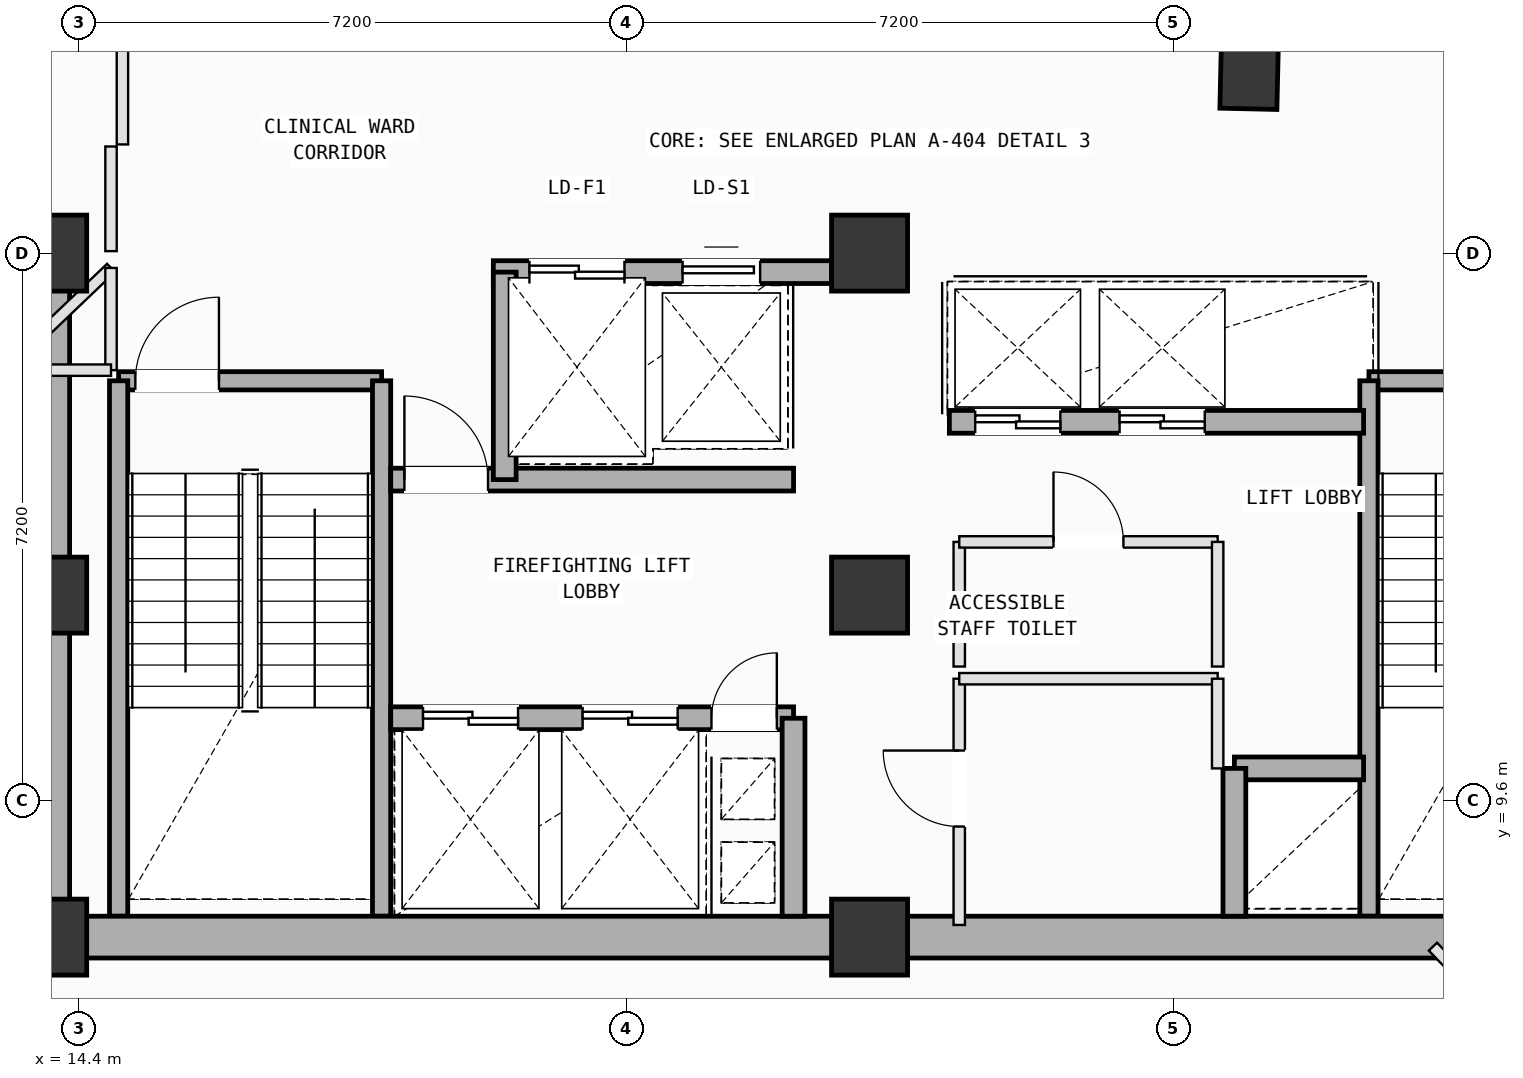
"""IFC4 building model, lengths in metres.
Left out: names, types, materials, properties, quantities, classifications, styles, units other than length and angle.
Written with IfcOpenShell. Run it as: python <this file> out.ifc"""

import sys

from ifc_helpers import new_model, si_unit, direction, frame, frame_2d, origin, origin_2d, place, context, subcontext, project, spatial, rectangle, extrude, element, fill, save


model = new_model("IFC4")
c1 = context("Model", 3, precision=1e-05, world=origin(), true_north=direction((0.0, 1.0)))
c2 = subcontext(c1, "Body", "Model", "MODEL_VIEW")
j1 = project(units=[si_unit("LENGTHUNIT", "METRE"), si_unit("PLANEANGLEUNIT", "RADIAN")], contexts=[c1])
p1 = place(None, origin())
s1 = spatial("IfcSite", under=j1, at=p1, CompositionType="ELEMENT")
p2 = place(p1, origin())
s2 = spatial("IfcBuilding", under=s1, at=p2, CompositionType="ELEMENT")
p3 = place(p2, frame((0.0, 0.0, 211.2)))
s3 = spatial("IfcBuildingStorey", under=s2, at=p3, CompositionType="ELEMENT", Elevation=211.2)
for number, where, z_axis, x_axis in (
    (1, (14.0, 7.8, 0.0), (0.0, 0.0, 1.0), (1.0, 0.0, 0.0)),
    (2, (14.0, 12.3, 0.0), (0.0, 0.0, 1.0), (1.0, 0.0, 0.0)),
    (3, (14.0, 16.8, 0.0), (0.0, 0.0, 1.0), (1.0, 0.0, 0.0)),
    (4, (24.8, 7.8, 0.0), (0.0, 0.0, 1.0), (1.0, 0.0, 0.0)),
    (5, (24.8, 12.3, 0.0), (0.0, 0.0, 1.0), (1.0, 0.0, 0.0)),
    (6, (24.8, 16.8, 0.0), (0.0, 0.0, 1.0), (1.0, 0.0, 0.0)),
):
    element("IfcColumn", number, at=place(p3, frame(where, z_axis=z_axis, x_axis=x_axis)), inside=s3, PredefinedType="COLUMN", context=c2, shape_type="SweptSolid", body=[
        extrude(rectangle(XDim=1.0, YDim=1.0, at=origin_2d()), origin(), (0.0, 0.0, 1.0), 4.0),
    ])
p4 = place(p3, frame((29.798, 19.298, 0.019), z_axis=(0.022938777207, -0.015578741739, 0.999615483727), x_axis=(-0.813978214162, 0.580233554641, 0.027721633021)))
e7 = element("IfcColumn", 7, at=p4, inside=s3, PredefinedType="COLUMN", context=c2, shape_type="SweptSolid", body=[
    extrude(rectangle(XDim=1.2, YDim=0.75, at=origin_2d()), origin(), (0.0, 0.0, 1.0), 3.98),
])
p5 = place(p3, frame((14.92, 15.12, 0.0), z_axis=(0.0, 0.0, 1.0), x_axis=(1.0, 0.0, 0.0)))
e8 = element("IfcWall", 8, at=p5, inside=s3, PredefinedType="SOLIDWALL", context=c2, shape_type="SweptSolid", body=[
    extrude(rectangle(XDim=3.46, YDim=0.24, at=frame_2d((1.73, 0.0))), origin(), (0.0, 0.0, 1.0), 3.78),
])
p6 = place(p5, frame((0.22, 0.0, 0.0)))
e9 = element("IfcOpeningElement", 9, at=p6, cuts=e8, PredefinedType="OPENING", context=c2, shape_type="SweptSolid", body=[
    extrude(rectangle(XDim=1.1, YDim=2.15, at=frame_2d((0.55, 1.075))), frame((0.0, 0.13, 0.0), z_axis=(0.0, -1.0, 0.0), x_axis=(1.0, 0.0, 0.0)), (0.0, 0.0, 1.0), 0.26),
])
for number, where, z_axis, x_axis in (
    (10, (18.38, 15.12, 0.0), (0.0, 0.0, 1.0), (0.0, -1.0, 0.0)),
    (11, (14.92, 8.075, 0.0), (0.0, 0.0, 1.0), (0.0, 1.0, 0.0)),
):
    element("IfcWall", number, at=place(p3, frame(where, z_axis=z_axis, x_axis=x_axis)), inside=s3, PredefinedType="SOLIDWALL", context=c2, shape_type="SweptSolid", body=[
        extrude(rectangle(XDim=7.045, YDim=0.24, at=frame_2d((3.522, 0.0))), origin(), (0.0, 0.0, 1.0), 3.78),
    ])
p7 = place(p3, frame((31.37, 15.12, 0.0), z_axis=(0.0, 0.0, 1.0), x_axis=(1.0, 0.0, 0.0)))
e12 = element("IfcWall", 12, at=p7, inside=s3, PredefinedType="SOLIDWALL", context=c2, shape_type="SweptSolid", body=[
    extrude(rectangle(XDim=3.46, YDim=0.24, at=frame_2d((1.73, 0.0))), origin(), (0.0, 0.0, 1.0), 3.78),
])
p8 = place(p7, frame((2.14, 0.0, 0.0)))
e13 = element("IfcOpeningElement", 13, at=p8, cuts=e12, PredefinedType="OPENING", context=c2, shape_type="SweptSolid", body=[
    extrude(rectangle(XDim=1.1, YDim=2.15, at=frame_2d((0.55, 1.075))), frame((0.0, 0.13, 0.0), z_axis=(0.0, -1.0, 0.0), x_axis=(1.0, 0.0, 0.0)), (0.0, 0.0, 1.0), 0.26),
])
p9 = place(p3, frame((31.37, 8.075, 0.0), z_axis=(0.0, 0.0, 1.0), x_axis=(0.0, 1.0, 0.0)))
e14 = element("IfcWall", 14, at=p9, inside=s3, PredefinedType="SOLIDWALL", context=c2, shape_type="SweptSolid", body=[
    extrude(rectangle(XDim=7.045, YDim=0.24, at=frame_2d((3.522, 0.0))), origin(), (0.0, 0.0, 1.0), 3.78),
])
for number, where, z_axis, x_axis in (
    (15, (14.0, 7.8, 0.0), (0.0, 0.0, 1.0), (1.0, 0.0, 0.0)),
    (16, (24.8, 7.8, 0.0), (0.0, 0.0, 1.0), (1.0, 0.0, 0.0)),
):
    element("IfcWall", number, at=place(p3, frame(where, z_axis=z_axis, x_axis=x_axis)), inside=s3, PredefinedType="SHEAR", context=c2, shape_type="SweptSolid", body=[
        extrude(rectangle(XDim=10.8, YDim=0.55, at=frame_2d((5.4, 0.0))), origin(), (0.0, 0.0, 1.0), 3.78),
    ])
p10 = place(p3, frame((14.0, 16.8, 0.0), z_axis=(0.0, 0.0, 1.0), x_axis=(0.0, -1.0, 0.0)))
e17 = element("IfcWall", 17, at=p10, inside=s3, PredefinedType="SHEAR", context=c2, shape_type="SweptSolid", body=[
    extrude(rectangle(XDim=9.0, YDim=0.55, at=frame_2d((4.5, 0.0))), origin(), (0.0, 0.0, 1.0), 3.78),
])
p11 = place(p3, frame((19.85, 16.55, 0.0), z_axis=(0.0, 0.0, 1.0), x_axis=(1.0, 0.0, 0.0)))
e18 = element("IfcWall", 18, at=p11, inside=s3, PredefinedType="SOLIDWALL", context=c2, shape_type="SweptSolid", body=[
    extrude(rectangle(XDim=4.45, YDim=0.3, at=frame_2d((2.225, 0.0))), origin(), (0.0, 0.0, 1.0), 3.78),
])
p12 = place(p11, frame((0.475, 0.0, 0.0)))
e19 = element("IfcOpeningElement", 19, at=p12, cuts=e18, PredefinedType="OPENING", context=c2, shape_type="SweptSolid", body=[
    extrude(rectangle(XDim=1.25, YDim=2.18, at=frame_2d((0.625, 1.09))), frame((0.0, 0.16, 0.0), z_axis=(0.0, -1.0, 0.0), x_axis=(1.0, 0.0, 0.0)), (0.0, 0.0, 1.0), 0.32),
])
p13 = place(p11, frame((2.49, 0.0, 0.0)))
e20 = element("IfcOpeningElement", 20, at=p13, cuts=e18, PredefinedType="OPENING", context=c2, shape_type="SweptSolid", body=[
    extrude(rectangle(XDim=1.02, YDim=2.12, at=frame_2d((0.51, 1.06))), frame((0.0, 0.16, 0.0), z_axis=(0.0, -1.0, 0.0), x_axis=(1.0, 0.0, 0.0)), (0.0, 0.0, 1.0), 0.32),
])
p14 = place(p3, frame((18.5, 10.68, 0.0), z_axis=(0.0, 0.0, 1.0), x_axis=(1.0, 0.0, 0.0)))
e21 = element("IfcWall", 21, at=p14, inside=s3, PredefinedType="SOLIDWALL", context=c2, shape_type="SweptSolid", body=[
    extrude(rectangle(XDim=5.3, YDim=0.3, at=frame_2d((2.65, 0.0))), origin(), (0.0, 0.0, 1.0), 3.78),
])
p15 = place(p14, frame((4.22, 0.0, 0.0)))
e22 = element("IfcOpeningElement", 22, at=p15, cuts=e21, PredefinedType="OPENING", context=c2, shape_type="SweptSolid", body=[
    extrude(rectangle(XDim=0.86, YDim=2.06, at=frame_2d((0.43, 1.03))), frame((0.0, 0.16, 0.0), z_axis=(0.0, -1.0, 0.0), x_axis=(1.0, 0.0, 0.0)), (0.0, 0.0, 1.0), 0.32),
])
p16 = place(p14, frame((0.425, 0.0, 0.0)))
e23 = element("IfcOpeningElement", 23, at=p16, cuts=e21, PredefinedType="OPENING", context=c2, shape_type="SweptSolid", body=[
    extrude(rectangle(XDim=1.25, YDim=2.18, at=frame_2d((0.625, 1.09))), frame((0.0, 0.16, 0.0), z_axis=(0.0, -1.0, 0.0), x_axis=(1.0, 0.0, 0.0)), (0.0, 0.0, 1.0), 0.32),
])
p17 = place(p14, frame((2.525, 0.0, 0.0)))
e24 = element("IfcOpeningElement", 24, at=p17, cuts=e21, PredefinedType="OPENING", context=c2, shape_type="SweptSolid", body=[
    extrude(rectangle(XDim=1.25, YDim=2.18, at=frame_2d((0.625, 1.09))), frame((0.0, 0.16, 0.0), z_axis=(0.0, -1.0, 0.0), x_axis=(1.0, 0.0, 0.0)), (0.0, 0.0, 1.0), 0.32),
])
p18 = place(p3, frame((18.5, 13.82, 0.0), z_axis=(0.0, 0.0, 1.0), x_axis=(1.0, 0.0, 0.0)))
e25 = element("IfcWall", 25, at=p18, inside=s3, PredefinedType="SOLIDWALL", context=c2, shape_type="SweptSolid", body=[
    extrude(rectangle(XDim=5.3, YDim=0.3, at=frame_2d((2.65, 0.0))), origin(), (0.0, 0.0, 1.0), 3.78),
])
p19 = place(p18, frame((0.18, 0.0, 0.0)))
e26 = element("IfcOpeningElement", 26, at=p19, cuts=e25, PredefinedType="OPENING", context=c2, shape_type="SweptSolid", body=[
    extrude(rectangle(XDim=1.1, YDim=2.15, at=frame_2d((0.55, 1.075))), frame((0.0, 0.16, 0.0), z_axis=(0.0, -1.0, 0.0), x_axis=(1.0, 0.0, 0.0)), (0.0, 0.0, 1.0), 0.32),
])
p20 = place(p3, frame((23.8, 8.075, 0.0), z_axis=(0.0, 0.0, 1.0), x_axis=(0.0, 1.0, 0.0)))
e27 = element("IfcWall", 27, at=p20, inside=s3, PredefinedType="SOLIDWALL", context=c2, shape_type="SweptSolid", body=[
    extrude(rectangle(XDim=2.605, YDim=0.3, at=frame_2d((1.302, 0.0))), origin(), (0.0, 0.0, 1.0), 3.78),
])
p21 = place(p3, frame((20.0, 13.82, 0.0), z_axis=(0.0, 0.0, 1.0), x_axis=(0.0, 1.0, 0.0)))
e28 = element("IfcWall", 28, at=p21, inside=s3, PredefinedType="SOLIDWALL", context=c2, shape_type="SweptSolid", body=[
    extrude(rectangle(XDim=2.73, YDim=0.3, at=frame_2d((1.365, 0.0))), origin(), (0.0, 0.0, 1.0), 3.78),
])
p22 = place(p3, frame((29.6, 10.02, 0.0), z_axis=(0.0, 0.0, 1.0), x_axis=(1.0, 0.0, 0.0)))
e29 = element("IfcWall", 29, at=p22, inside=s3, PredefinedType="SOLIDWALL", context=c2, shape_type="SweptSolid", body=[
    extrude(rectangle(XDim=1.7, YDim=0.3, at=frame_2d((0.85, 0.0))), origin(), (0.0, 0.0, 1.0), 3.78),
])
p23 = place(p3, frame((29.6, 8.075, 0.0), z_axis=(0.0, 0.0, 1.0), x_axis=(0.0, 1.0, 0.0)))
e30 = element("IfcWall", 30, at=p23, inside=s3, PredefinedType="SOLIDWALL", context=c2, shape_type="SweptSolid", body=[
    extrude(rectangle(XDim=1.945, YDim=0.3, at=frame_2d((0.973, 0.0))), origin(), (0.0, 0.0, 1.0), 3.78),
])
p24 = place(p3, frame((25.85, 14.58, 0.0), z_axis=(0.0, 0.0, 1.0), x_axis=(1.0, 0.0, 0.0)))
e31 = element("IfcWall", 31, at=p24, inside=s3, PredefinedType="SOLIDWALL", context=c2, shape_type="SweptSolid", body=[
    extrude(rectangle(XDim=5.45, YDim=0.3, at=frame_2d((2.725, 0.0))), origin(), (0.0, 0.0, 1.0), 3.78),
])
p25 = place(p24, frame((0.34, 0.0, 0.0)))
e32 = element("IfcOpeningElement", 32, at=p25, cuts=e31, PredefinedType="OPENING", context=c2, shape_type="SweptSolid", body=[
    extrude(rectangle(XDim=1.12, YDim=2.15, at=frame_2d((0.56, 1.075))), frame((0.0, 0.16, 0.0), z_axis=(0.0, -1.0, 0.0), x_axis=(1.0, 0.0, 0.0)), (0.0, 0.0, 1.0), 0.32),
])
p26 = place(p24, frame((2.24, 0.0, 0.0)))
e33 = element("IfcOpeningElement", 33, at=p26, cuts=e31, PredefinedType="OPENING", context=c2, shape_type="SweptSolid", body=[
    extrude(rectangle(XDim=1.12, YDim=2.15, at=frame_2d((0.56, 1.075))), frame((0.0, 0.16, 0.0), z_axis=(0.0, -1.0, 0.0), x_axis=(1.0, 0.0, 0.0)), (0.0, 0.0, 1.0), 0.32),
])
p27 = place(p3, frame((25.98, 7.96, 0.0), z_axis=(0.0, 0.0, 1.0), x_axis=(0.0, 1.0, 0.0)))
e34 = element("IfcWall", 34, at=p27, inside=s3, PredefinedType="PARTITIONING", context=c2, shape_type="SweptSolid", body=[
    extrude(rectangle(XDim=3.24, YDim=0.15, at=frame_2d((1.62, 0.0))), origin(), (0.0, 0.0, 1.0), 3.78),
])
p28 = place(p27, frame((1.295, 0.0, 0.0)))
e35 = element("IfcOpeningElement", 35, at=p28, cuts=e34, PredefinedType="OPENING", context=c2, shape_type="SweptSolid", body=[
    extrude(rectangle(XDim=1.0, YDim=2.12, at=frame_2d((0.5, 1.06))), frame((0.0, 0.085, 0.0), z_axis=(0.0, -1.0, 0.0), x_axis=(1.0, 0.0, 0.0)), (0.0, 0.0, 1.0), 0.17),
])
p29 = place(p3, frame((25.98, 11.2, 0.0), z_axis=(0.0, 0.0, 1.0), x_axis=(1.0, 0.0, 0.0)))
e36 = element("IfcWall", 36, at=p29, inside=s3, PredefinedType="PARTITIONING", context=c2, shape_type="SweptSolid", body=[
    extrude(rectangle(XDim=3.4, YDim=0.15, at=frame_2d((1.7, 0.0))), origin(), (0.0, 0.0, 1.0), 3.78),
])
p30 = place(p3, frame((29.38, 11.2, 0.0), z_axis=(0.0, 0.0, 1.0), x_axis=(0.0, -1.0, 0.0)))
e37 = element("IfcWall", 37, at=p30, inside=s3, PredefinedType="PARTITIONING", context=c2, shape_type="SweptSolid", body=[
    extrude(rectangle(XDim=1.18, YDim=0.15, at=frame_2d((0.59, 0.0))), origin(), (0.0, 0.0, 1.0), 3.78),
])
p31 = place(p3, frame((25.98, 11.36, 0.0), z_axis=(0.0, 0.0, 1.0), x_axis=(0.0, 1.0, 0.0)))
e38 = element("IfcWall", 38, at=p31, inside=s3, PredefinedType="PARTITIONING", context=c2, shape_type="SweptSolid", body=[
    extrude(rectangle(XDim=1.64, YDim=0.15, at=frame_2d((0.82, 0.0))), origin(), (0.0, 0.0, 1.0), 3.78),
])
p32 = place(p3, frame((25.98, 13.0, 0.0), z_axis=(0.0, 0.0, 1.0), x_axis=(1.0, 0.0, 0.0)))
e39 = element("IfcWall", 39, at=p32, inside=s3, PredefinedType="PARTITIONING", context=c2, shape_type="SweptSolid", body=[
    extrude(rectangle(XDim=3.4, YDim=0.15, at=frame_2d((1.7, 0.0))), origin(), (0.0, 0.0, 1.0), 3.78),
])
p33 = place(p32, frame((1.24, 0.0, 0.0)))
e40 = element("IfcOpeningElement", 40, at=p33, cuts=e39, PredefinedType="OPENING", context=c2, shape_type="SweptSolid", body=[
    extrude(rectangle(XDim=0.92, YDim=2.1, at=frame_2d((0.46, 1.05))), frame((0.0, 0.085, 0.0), z_axis=(0.0, -1.0, 0.0), x_axis=(1.0, 0.0, 0.0)), (0.0, 0.0, 1.0), 0.17),
])
p34 = place(p3, frame((29.38, 13.0, 0.0), z_axis=(0.0, 0.0, 1.0), x_axis=(0.0, -1.0, 0.0)))
e41 = element("IfcWall", 41, at=p34, inside=s3, PredefinedType="PARTITIONING", context=c2, shape_type="SweptSolid", body=[
    extrude(rectangle(XDim=1.64, YDim=0.15, at=frame_2d((0.82, 0.0))), origin(), (0.0, 0.0, 1.0), 3.78),
])
p35 = place(p3, frame((32.212, 7.675, 0.0), z_axis=(0.0, 0.0, 1.0), x_axis=(0.690869154535, -0.722979813903, 0.0)))
e42 = element("IfcWall", 42, at=p35, inside=s3, PredefinedType="PARTITIONING", context=c2, shape_type="SweptSolid", body=[
    extrude(rectangle(XDim=10.713, YDim=0.15, at=frame_2d((5.356, 0.0))), origin(), (0.0, 0.0, 1.0), 3.78),
])
p36 = place(p35, frame((5.14, 0.0, 0.0)))
e43 = element("IfcOpeningElement", 43, at=p36, cuts=e42, PredefinedType="OPENING", context=c2, shape_type="SweptSolid", body=[
    extrude(rectangle(XDim=0.86, YDim=2.06, at=frame_2d((0.43, 1.03))), frame((0.0, 0.085, 0.0), z_axis=(0.0, -1.0, 0.0), x_axis=(1.0, 0.0, 0.0)), (0.0, 0.0, 1.0), 0.17),
])
p37 = place(p3, frame((8.967, 11.011, 0.0), z_axis=(0.0, 0.0, 1.0), x_axis=(0.72292274285, 0.690928873235, 0.0)))
e44 = element("IfcWall", 44, at=p37, inside=s3, PredefinedType="PARTITIONING", context=c2, shape_type="SweptSolid", body=[
    extrude(rectangle(XDim=8.096, YDim=0.15, at=frame_2d((4.048, 0.0))), origin(), (0.0, 0.0, 1.0), 3.78),
])
p38 = place(p37, frame((3.448, 0.0, 0.0)))
e45 = element("IfcOpeningElement", 45, at=p38, cuts=e44, PredefinedType="OPENING", context=c2, shape_type="SweptSolid", body=[
    extrude(rectangle(XDim=1.2, YDim=2.15, at=frame_2d((0.6, 1.075))), frame((0.0, 0.085, 0.0), z_axis=(0.0, -1.0, 0.0), x_axis=(1.0, 0.0, 0.0)), (0.0, 0.0, 1.0), 0.17),
])
p39 = place(p3, frame((14.82, 16.605, 0.0), z_axis=(0.0, 0.0, 1.0), x_axis=(0.0, -1.0, 0.0)))
e46 = element("IfcWall", 46, at=p39, inside=s3, PredefinedType="PARTITIONING", context=c2, shape_type="SweptSolid", body=[
    extrude(rectangle(XDim=1.345, YDim=0.15, at=frame_2d((0.672, 0.0))), origin(), (0.0, 0.0, 1.0), 3.78),
])
p40 = place(p3, frame((14.82, 15.26, 0.0), z_axis=(0.0, 0.0, 1.0), x_axis=(-1.0, 0.0, 0.0)))
e47 = element("IfcWall", 47, at=p40, inside=s3, PredefinedType="PARTITIONING", context=c2, shape_type="SweptSolid", body=[
    extrude(rectangle(XDim=1.12, YDim=0.15, at=frame_2d((0.56, 0.0))), origin(), (0.0, 0.0, 1.0), 3.78),
])
p41 = place(p3, frame((14.97, 20.55, 0.0), z_axis=(0.0, 0.0, 1.0), x_axis=(0.0, -1.0, 0.0)))
e48 = element("IfcWall", 48, at=p41, inside=s3, PredefinedType="PARTITIONING", context=c2, shape_type="SweptSolid", body=[
    extrude(rectangle(XDim=2.32, YDim=0.15, at=frame_2d((1.16, 0.0))), origin(), (0.0, 0.0, 1.0), 3.78),
])
p42 = place(p3, frame((14.82, 18.203, 0.0), z_axis=(0.0, 0.0, 1.0), x_axis=(0.0, -1.0, 0.0)))
e49 = element("IfcWall", 49, at=p42, inside=s3, PredefinedType="PARTITIONING", context=c2, shape_type="SweptSolid", body=[
    extrude(rectangle(XDim=1.377, YDim=0.15, at=frame_2d((0.688, 0.0))), origin(), (0.0, 0.0, 1.0), 3.78),
])
p43 = place(p3, frame((5.374, 14.771, 0.0), z_axis=(0.0, 0.0, 1.0), x_axis=(0.722993367921, 0.690854970267, 0.0)))
e50 = element("IfcWall", 50, at=p43, inside=s3, PredefinedType="PARTITIONING", context=c2, shape_type="SweptSolid", body=[
    extrude(rectangle(XDim=15.186, YDim=0.15, at=frame_2d((7.593, 0.0))), origin(), (0.0, 0.0, 1.0), 3.78),
])
p44 = place(p6, origin())
e51 = element("IfcDoor", 51, at=p44, inside=s3, OperationType="SINGLE_SWING_RIGHT", PredefinedType="DOOR", context=c2, shape_type="SweptSolid", body=[
    extrude(rectangle(XDim=1.1, YDim=2.15, at=frame_2d((0.55, 1.075))), frame((0.0, 0.025, 0.0), z_axis=(0.0, -1.0, 0.0), x_axis=(1.0, 0.0, 0.0)), (0.0, 0.0, 1.0), 0.05),
])
fill(e9, e51)
p45 = place(p15, origin())
e52 = element("IfcDoor", 52, at=p45, inside=s3, OperationType="SINGLE_SWING_RIGHT", PredefinedType="DOOR", context=c2, shape_type="SweptSolid", body=[
    extrude(rectangle(XDim=0.86, YDim=2.06, at=frame_2d((0.43, 1.03))), frame((0.0, 0.025, 0.0), z_axis=(0.0, -1.0, 0.0), x_axis=(1.0, 0.0, 0.0)), (0.0, 0.0, 1.0), 0.05),
])
fill(e22, e52)
p46 = place(p19, origin())
e53 = element("IfcDoor", 53, at=p46, inside=s3, OperationType="SINGLE_SWING_LEFT", PredefinedType="DOOR", context=c2, shape_type="SweptSolid", body=[
    extrude(rectangle(XDim=1.1, YDim=2.15, at=frame_2d((0.55, 1.075))), frame((0.0, 0.025, 0.0), z_axis=(0.0, -1.0, 0.0), x_axis=(1.0, 0.0, 0.0)), (0.0, 0.0, 1.0), 0.05),
])
fill(e26, e53)
p47 = place(p16, origin())
e54 = element("IfcDoor", 54, at=p47, inside=s3, OperationType="DOUBLE_DOOR_SLIDING", PredefinedType="DOOR", context=c2, shape_type="SweptSolid", body=[
    extrude(rectangle(XDim=1.25, YDim=2.18, at=frame_2d((0.625, 1.09))), frame((0.0, 0.025, 0.0), z_axis=(0.0, -1.0, 0.0), x_axis=(1.0, 0.0, 0.0)), (0.0, 0.0, 1.0), 0.05),
])
fill(e23, e54)
p48 = place(p17, origin())
e55 = element("IfcDoor", 55, at=p48, inside=s3, OperationType="DOUBLE_DOOR_SLIDING", PredefinedType="DOOR", context=c2, shape_type="SweptSolid", body=[
    extrude(rectangle(XDim=1.25, YDim=2.18, at=frame_2d((0.625, 1.09))), frame((0.0, 0.025, 0.0), z_axis=(0.0, -1.0, 0.0), x_axis=(1.0, 0.0, 0.0)), (0.0, 0.0, 1.0), 0.05),
])
fill(e24, e55)
p49 = place(p25, origin())
e56 = element("IfcDoor", 56, at=p49, inside=s3, OperationType="DOUBLE_DOOR_SLIDING", PredefinedType="DOOR", context=c2, shape_type="SweptSolid", body=[
    extrude(rectangle(XDim=1.12, YDim=2.15, at=frame_2d((0.56, 1.075))), frame((0.0, 0.025, 0.0), z_axis=(0.0, -1.0, 0.0), x_axis=(1.0, 0.0, 0.0)), (0.0, 0.0, 1.0), 0.05),
])
fill(e32, e56)
p50 = place(p26, origin())
e57 = element("IfcDoor", 57, at=p50, inside=s3, OperationType="DOUBLE_DOOR_SLIDING", PredefinedType="DOOR", context=c2, shape_type="SweptSolid", body=[
    extrude(rectangle(XDim=1.12, YDim=2.15, at=frame_2d((0.56, 1.075))), frame((0.0, 0.025, 0.0), z_axis=(0.0, -1.0, 0.0), x_axis=(1.0, 0.0, 0.0)), (0.0, 0.0, 1.0), 0.05),
])
fill(e33, e57)
p51 = place(p12, origin())
e58 = element("IfcDoor", 58, at=p51, inside=s3, OperationType="DOUBLE_DOOR_SLIDING", PredefinedType="DOOR", context=c2, shape_type="SweptSolid", body=[
    extrude(rectangle(XDim=1.25, YDim=2.18, at=frame_2d((0.625, 1.09))), frame((0.0, 0.025, 0.0), z_axis=(0.0, -1.0, 0.0), x_axis=(1.0, 0.0, 0.0)), (0.0, 0.0, 1.0), 0.05),
])
fill(e19, e58)
p52 = place(p13, origin())
e59 = element("IfcDoor", 59, at=p52, inside=s3, OperationType="SLIDING_TO_LEFT", PredefinedType="DOOR", context=c2, shape_type="SweptSolid", body=[
    extrude(rectangle(XDim=1.02, YDim=2.12, at=frame_2d((0.51, 1.06))), frame((0.0, 0.025, 0.0), z_axis=(0.0, -1.0, 0.0), x_axis=(1.0, 0.0, 0.0)), (0.0, 0.0, 1.0), 0.05),
])
fill(e20, e59)
p53 = place(p28, origin())
e60 = element("IfcDoor", 60, at=p53, inside=s3, OperationType="SINGLE_SWING_RIGHT", PredefinedType="DOOR", context=c2, shape_type="SweptSolid", body=[
    extrude(rectangle(XDim=1.0, YDim=2.12, at=frame_2d((0.5, 1.06))), frame((0.0, 0.025, 0.0), z_axis=(0.0, -1.0, 0.0), x_axis=(1.0, 0.0, 0.0)), (0.0, 0.0, 1.0), 0.05),
])
fill(e35, e60)
p54 = place(p33, origin())
e61 = element("IfcDoor", 61, at=p54, inside=s3, OperationType="SINGLE_SWING_LEFT", PredefinedType="DOOR", context=c2, shape_type="SweptSolid", body=[
    extrude(rectangle(XDim=0.92, YDim=2.1, at=frame_2d((0.46, 1.05))), frame((0.0, 0.025, 0.0), z_axis=(0.0, -1.0, 0.0), x_axis=(1.0, 0.0, 0.0)), (0.0, 0.0, 1.0), 0.05),
])
fill(e40, e61)
save(model, sys.argv[1])
